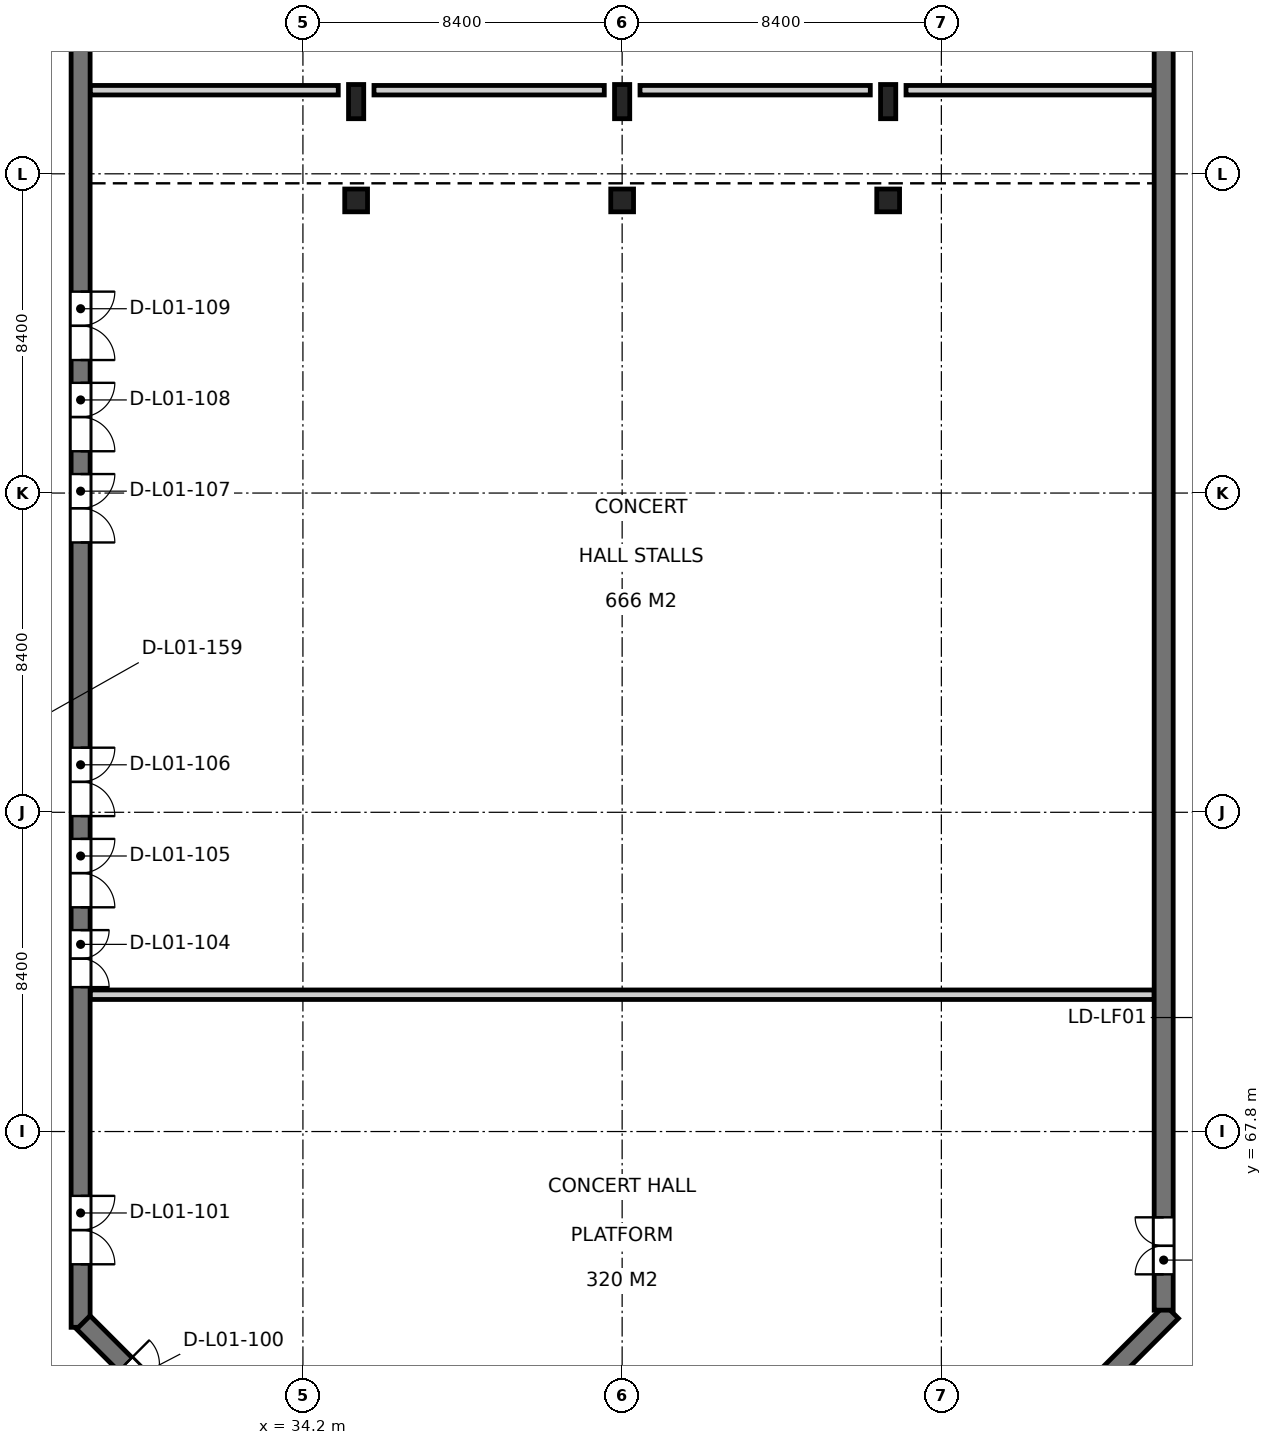
"""IFC4 building model, lengths in metres.
Left out: names, types, materials, properties, quantities, classifications, styles, units other than length and angle.
Written with IfcOpenShell. Run it as: python <this file> out.ifc"""

import sys

from ifc_helpers import new_model, si_unit, direction, frame, frame_2d, origin, origin_2d, place, context, subcontext, project, spatial, rectangle, extrude, element, fill, save


model = new_model("IFC4")
c1 = context("Model", 3, precision=1e-05, world=origin(), true_north=direction((0.0, 1.0)))
c2 = subcontext(c1, "Body", "Model", "MODEL_VIEW")
j1 = project(units=[si_unit("LENGTHUNIT", "METRE"), si_unit("PLANEANGLEUNIT", "RADIAN")], contexts=[c1])
p1 = place(None, origin())
s1 = spatial("IfcSite", under=j1, at=p1, CompositionType="ELEMENT")
p2 = place(p1, origin())
s2 = spatial("IfcBuilding", under=s1, at=p2, CompositionType="ELEMENT")
p3 = place(p2, frame((0.0, 0.0, 4.8)))
s3 = spatial("IfcBuildingStorey", under=s2, at=p3, CompositionType="ELEMENT", Elevation=4.8)
for number, where, z_axis, x_axis in (
    (1, (35.6, 92.3, 0.0), (0.0, 0.0, 1.0), (1.0, 0.0, 0.0)),
    (2, (42.6, 92.3, 0.0), (0.0, 0.0, 1.0), (1.0, 0.0, 0.0)),
    (3, (49.6, 92.3, 0.0), (0.0, 0.0, 1.0), (1.0, 0.0, 0.0)),
):
    element("IfcColumn", number, at=place(p3, frame(where, z_axis=z_axis, x_axis=x_axis)), inside=s3, PredefinedType="COLUMN", context=c2, shape_type="SweptSolid", body=[
        extrude(rectangle(XDim=0.6, YDim=0.6, at=origin_2d()), origin(), (0.0, 0.0, 1.0), 1.094),
    ])
for number, where, z_axis, x_axis in (
    (4, (35.6, 94.9, 0.0), (0.0, 0.0, 1.0), (1.0, 0.0, 0.0)),
    (5, (42.6, 94.9, 0.0), (0.0, 0.0, 1.0), (1.0, 0.0, 0.0)),
    (6, (49.6, 94.9, 0.0), (0.0, 0.0, 1.0), (1.0, 0.0, 0.0)),
):
    element("IfcColumn", number, at=place(p3, frame(where, z_axis=z_axis, x_axis=x_axis)), inside=s3, PredefinedType="COLUMN", context=c2, shape_type="SweptSolid", body=[
        extrude(rectangle(XDim=0.4, YDim=0.9, at=origin_2d()), origin(), (0.0, 0.0, 1.0), 4.8),
    ])
p4 = place(p3, frame((53.723, 59.723, 0.0), z_axis=(0.0, 0.0, 1.0), x_axis=(0.707106781187, 0.707106781187, 0.0)))
e7 = element("IfcWall", 7, at=p4, inside=s3, PredefinedType="SOLIDWALL", context=c2, shape_type="SweptSolid", body=[
    extrude(rectangle(XDim=4.721, YDim=0.5, at=frame_2d((2.36, 0.0))), origin(), (0.0, 0.0, 1.0), 4.8),
])
p5 = place(p4, frame((0.847, 0.0, 0.0)))
e8 = element("IfcOpeningElement", 8, at=p5, cuts=e7, PredefinedType="OPENING", context=c2, shape_type="SweptSolid", body=[
    extrude(rectangle(XDim=1.2, YDim=2.1, at=frame_2d((0.6, 1.05))), frame((0.0, 0.26, 0.0), z_axis=(0.0, -1.0, 0.0), x_axis=(1.0, 0.0, 0.0)), (0.0, 0.0, 1.0), 0.52),
])
p6 = place(p3, frame((56.85, 63.1, 0.0), z_axis=(0.0, 0.0, 1.0), x_axis=(0.0, 1.0, 0.0)))
e9 = element("IfcWall", 9, at=p6, inside=s3, PredefinedType="SOLIDWALL", context=c2, shape_type="SweptSolid", body=[
    extrude(rectangle(XDim=38.151, YDim=0.5, at=frame_2d((19.076, 0.0))), origin(), (0.0, 0.0, 1.0), 4.8),
])
p7 = place(p6, frame((0.942, 0.0, 0.0)))
e10 = element("IfcOpeningElement", 10, at=p7, cuts=e9, PredefinedType="OPENING", context=c2, shape_type="SweptSolid", body=[
    extrude(rectangle(XDim=1.5, YDim=2.1, at=frame_2d((0.75, 1.05))), frame((0.0, 0.26, 0.0), z_axis=(0.0, -1.0, 0.0), x_axis=(1.0, 0.0, 0.0)), (0.0, 0.0, 1.0), 0.52),
])
p8 = place(p3, frame((28.35, 100.8, 0.0), z_axis=(0.0, 0.0, 1.0), x_axis=(0.0, -1.0, 0.0)))
e11 = element("IfcWall", 11, at=p8, inside=s3, PredefinedType="SOLIDWALL", context=c2, shape_type="SweptSolid", body=[
    extrude(rectangle(XDim=38.151, YDim=0.5, at=frame_2d((19.076, 0.0))), origin(), (0.0, 0.0, 1.0), 4.8),
])
p9 = place(p8, frame((34.693, 0.0, 0.0)))
e12 = element("IfcOpeningElement", 12, at=p9, cuts=e11, PredefinedType="OPENING", context=c2, shape_type="SweptSolid", body=[
    extrude(rectangle(XDim=1.8, YDim=2.4, at=frame_2d((0.9, 1.2))), frame((0.0, 0.26, 0.0), z_axis=(0.0, -1.0, 0.0), x_axis=(1.0, 0.0, 0.0)), (0.0, 0.0, 1.0), 0.52),
])
p10 = place(p8, frame((27.7, 0.0, 0.0)))
e13 = element("IfcOpeningElement", 13, at=p10, cuts=e11, PredefinedType="OPENING", context=c2, shape_type="SweptSolid", body=[
    extrude(rectangle(XDim=1.5, YDim=2.1, at=frame_2d((0.75, 1.05))), frame((0.0, 0.26, 0.0), z_axis=(0.0, -1.0, 0.0), x_axis=(1.0, 0.0, 0.0)), (0.0, 0.0, 1.0), 0.52),
])
p11 = place(p8, frame((25.3, 0.0, 0.0)))
e14 = element("IfcOpeningElement", 14, at=p11, cuts=e11, PredefinedType="OPENING", context=c2, shape_type="SweptSolid", body=[
    extrude(rectangle(XDim=1.8, YDim=2.4, at=frame_2d((0.9, 1.2))), frame((0.0, 0.26, 0.0), z_axis=(0.0, -1.0, 0.0), x_axis=(1.0, 0.0, 0.0)), (0.0, 0.0, 1.0), 0.52),
])
p12 = place(p8, frame((22.9, 0.0, 0.0)))
e15 = element("IfcOpeningElement", 15, at=p12, cuts=e11, PredefinedType="OPENING", context=c2, shape_type="SweptSolid", body=[
    extrude(rectangle(XDim=1.8, YDim=2.4, at=frame_2d((0.9, 1.2))), frame((0.0, 0.26, 0.0), z_axis=(0.0, -1.0, 0.0), x_axis=(1.0, 0.0, 0.0)), (0.0, 0.0, 1.0), 0.52),
])
p13 = place(p8, frame((15.7, 0.0, 0.0)))
e16 = element("IfcOpeningElement", 16, at=p13, cuts=e11, PredefinedType="OPENING", context=c2, shape_type="SweptSolid", body=[
    extrude(rectangle(XDim=1.8, YDim=2.4, at=frame_2d((0.9, 1.2))), frame((0.0, 0.26, 0.0), z_axis=(0.0, -1.0, 0.0), x_axis=(1.0, 0.0, 0.0)), (0.0, 0.0, 1.0), 0.52),
])
p14 = place(p8, frame((13.3, 0.0, 0.0)))
e17 = element("IfcOpeningElement", 17, at=p14, cuts=e11, PredefinedType="OPENING", context=c2, shape_type="SweptSolid", body=[
    extrude(rectangle(XDim=1.8, YDim=2.4, at=frame_2d((0.9, 1.2))), frame((0.0, 0.26, 0.0), z_axis=(0.0, -1.0, 0.0), x_axis=(1.0, 0.0, 0.0)), (0.0, 0.0, 1.0), 0.52),
])
p15 = place(p8, frame((10.9, 0.0, 0.0)))
e18 = element("IfcOpeningElement", 18, at=p15, cuts=e11, PredefinedType="OPENING", context=c2, shape_type="SweptSolid", body=[
    extrude(rectangle(XDim=1.8, YDim=2.4, at=frame_2d((0.9, 1.2))), frame((0.0, 0.26, 0.0), z_axis=(0.0, -1.0, 0.0), x_axis=(1.0, 0.0, 0.0)), (0.0, 0.0, 1.0), 0.52),
])
p16 = place(p3, frame((28.423, 62.777, 0.0), z_axis=(0.0, 0.0, 1.0), x_axis=(0.707106781187, -0.707106781187, 0.0)))
e19 = element("IfcWall", 19, at=p16, inside=s3, PredefinedType="SOLIDWALL", context=c2, shape_type="SweptSolid", body=[
    extrude(rectangle(XDim=4.32, YDim=0.5, at=frame_2d((2.16, 0.0))), origin(), (0.0, 0.0, 1.0), 4.8),
])
p17 = place(p16, frame((1.558, 0.0, 0.0)))
e20 = element("IfcOpeningElement", 20, at=p17, cuts=e19, PredefinedType="OPENING", context=c2, shape_type="SweptSolid", body=[
    extrude(rectangle(XDim=1.8, YDim=2.4, at=frame_2d((0.9, 1.2))), frame((0.0, 0.26, 0.0), z_axis=(0.0, -1.0, 0.0), x_axis=(1.0, 0.0, 0.0)), (0.0, 0.0, 1.0), 0.52),
])
p18 = place(p3, frame((28.6, 71.4, 0.0), z_axis=(0.0, 0.0, 1.0), x_axis=(1.0, 0.0, 0.0)))
e21 = element("IfcWall", 21, at=p18, inside=s3, PredefinedType="PARTITIONING", context=c2, shape_type="SweptSolid", body=[
    extrude(rectangle(XDim=28.0, YDim=0.25, at=frame_2d((14.0, 0.0))), origin(), (0.0, 0.0, 1.0), 21.25),
])
p19 = place(p3, frame((28.6, 95.2, 0.0), z_axis=(0.0, 0.0, 1.0), x_axis=(1.0, 0.0, 0.0)))
e22 = element("IfcWall", 22, at=p19, inside=s3, PredefinedType="PARTITIONING", context=c2, shape_type="SweptSolid", body=[
    extrude(rectangle(XDim=6.53, YDim=0.25, at=frame_2d((3.265, 0.0))), origin(), (0.0, 0.0, 1.0), 3.58),
])
for number, where, z_axis, x_axis in (
    (23, (36.07, 95.2, 0.0), (0.0, 0.0, 1.0), (1.0, 0.0, 0.0)),
    (24, (43.07, 95.2, 0.0), (0.0, 0.0, 1.0), (1.0, 0.0, 0.0)),
):
    element("IfcWall", number, at=place(p3, frame(where, z_axis=z_axis, x_axis=x_axis)), inside=s3, PredefinedType="PARTITIONING", context=c2, shape_type="SweptSolid", body=[
        extrude(rectangle(XDim=6.06, YDim=0.25, at=frame_2d((3.03, 0.0))), origin(), (0.0, 0.0, 1.0), 3.58),
    ])
p20 = place(p3, frame((50.07, 95.2, 0.0), z_axis=(0.0, 0.0, 1.0), x_axis=(1.0, 0.0, 0.0)))
e25 = element("IfcWall", 25, at=p20, inside=s3, PredefinedType="PARTITIONING", context=c2, shape_type="SweptSolid", body=[
    extrude(rectangle(XDim=6.53, YDim=0.25, at=frame_2d((3.265, 0.0))), origin(), (0.0, 0.0, 1.0), 3.58),
])
p21 = place(p17, origin())
e26 = element("IfcDoor", 26, at=p21, inside=s3, OperationType="DOUBLE_DOOR_SINGLE_SWING", PredefinedType="DOOR", context=c2, shape_type="SweptSolid", body=[
    extrude(rectangle(XDim=1.8, YDim=2.4, at=frame_2d((0.9, 1.2))), frame((0.0, 0.025, 0.0), z_axis=(0.0, -1.0, 0.0), x_axis=(1.0, 0.0, 0.0)), (0.0, 0.0, 1.0), 0.05),
])
fill(e20, e26)
p22 = place(p9, origin())
e27 = element("IfcDoor", 27, at=p22, inside=s3, OperationType="DOUBLE_DOOR_SINGLE_SWING", PredefinedType="DOOR", context=c2, shape_type="SweptSolid", body=[
    extrude(rectangle(XDim=1.8, YDim=2.4, at=frame_2d((0.9, 1.2))), frame((0.0, 0.025, 0.0), z_axis=(0.0, -1.0, 0.0), x_axis=(1.0, 0.0, 0.0)), (0.0, 0.0, 1.0), 0.05),
])
fill(e12, e27)
p23 = place(p7, origin())
e28 = element("IfcDoor", 28, at=p23, inside=s3, OperationType="DOUBLE_DOOR_SINGLE_SWING", PredefinedType="DOOR", context=c2, shape_type="SweptSolid", body=[
    extrude(rectangle(XDim=1.5, YDim=2.1, at=frame_2d((0.75, 1.05))), frame((0.0, 0.025, 0.0), z_axis=(0.0, -1.0, 0.0), x_axis=(1.0, 0.0, 0.0)), (0.0, 0.0, 1.0), 0.05),
])
fill(e10, e28)
p24 = place(p10, origin())
e29 = element("IfcDoor", 29, at=p24, inside=s3, OperationType="DOUBLE_DOOR_SINGLE_SWING", PredefinedType="DOOR", context=c2, shape_type="SweptSolid", body=[
    extrude(rectangle(XDim=1.5, YDim=2.1, at=frame_2d((0.75, 1.05))), frame((0.0, 0.025, 0.0), z_axis=(0.0, -1.0, 0.0), x_axis=(1.0, 0.0, 0.0)), (0.0, 0.0, 1.0), 0.05),
])
fill(e13, e29)
p25 = place(p11, origin())
e30 = element("IfcDoor", 30, at=p25, inside=s3, OperationType="DOUBLE_DOOR_SINGLE_SWING", PredefinedType="DOOR", context=c2, shape_type="SweptSolid", body=[
    extrude(rectangle(XDim=1.8, YDim=2.4, at=frame_2d((0.9, 1.2))), frame((0.0, 0.025, 0.0), z_axis=(0.0, -1.0, 0.0), x_axis=(1.0, 0.0, 0.0)), (0.0, 0.0, 1.0), 0.05),
])
fill(e14, e30)
p26 = place(p12, origin())
e31 = element("IfcDoor", 31, at=p26, inside=s3, OperationType="DOUBLE_DOOR_SINGLE_SWING", PredefinedType="DOOR", context=c2, shape_type="SweptSolid", body=[
    extrude(rectangle(XDim=1.8, YDim=2.4, at=frame_2d((0.9, 1.2))), frame((0.0, 0.025, 0.0), z_axis=(0.0, -1.0, 0.0), x_axis=(1.0, 0.0, 0.0)), (0.0, 0.0, 1.0), 0.05),
])
fill(e15, e31)
p27 = place(p13, origin())
e32 = element("IfcDoor", 32, at=p27, inside=s3, OperationType="DOUBLE_DOOR_SINGLE_SWING", PredefinedType="DOOR", context=c2, shape_type="SweptSolid", body=[
    extrude(rectangle(XDim=1.8, YDim=2.4, at=frame_2d((0.9, 1.2))), frame((0.0, 0.025, 0.0), z_axis=(0.0, -1.0, 0.0), x_axis=(1.0, 0.0, 0.0)), (0.0, 0.0, 1.0), 0.05),
])
fill(e16, e32)
p28 = place(p14, origin())
e33 = element("IfcDoor", 33, at=p28, inside=s3, OperationType="DOUBLE_DOOR_SINGLE_SWING", PredefinedType="DOOR", context=c2, shape_type="SweptSolid", body=[
    extrude(rectangle(XDim=1.8, YDim=2.4, at=frame_2d((0.9, 1.2))), frame((0.0, 0.025, 0.0), z_axis=(0.0, -1.0, 0.0), x_axis=(1.0, 0.0, 0.0)), (0.0, 0.0, 1.0), 0.05),
])
fill(e17, e33)
p29 = place(p15, origin())
e34 = element("IfcDoor", 34, at=p29, inside=s3, OperationType="DOUBLE_DOOR_SINGLE_SWING", PredefinedType="DOOR", context=c2, shape_type="SweptSolid", body=[
    extrude(rectangle(XDim=1.8, YDim=2.4, at=frame_2d((0.9, 1.2))), frame((0.0, 0.025, 0.0), z_axis=(0.0, -1.0, 0.0), x_axis=(1.0, 0.0, 0.0)), (0.0, 0.0, 1.0), 0.05),
])
fill(e18, e34)
save(model, sys.argv[1])
